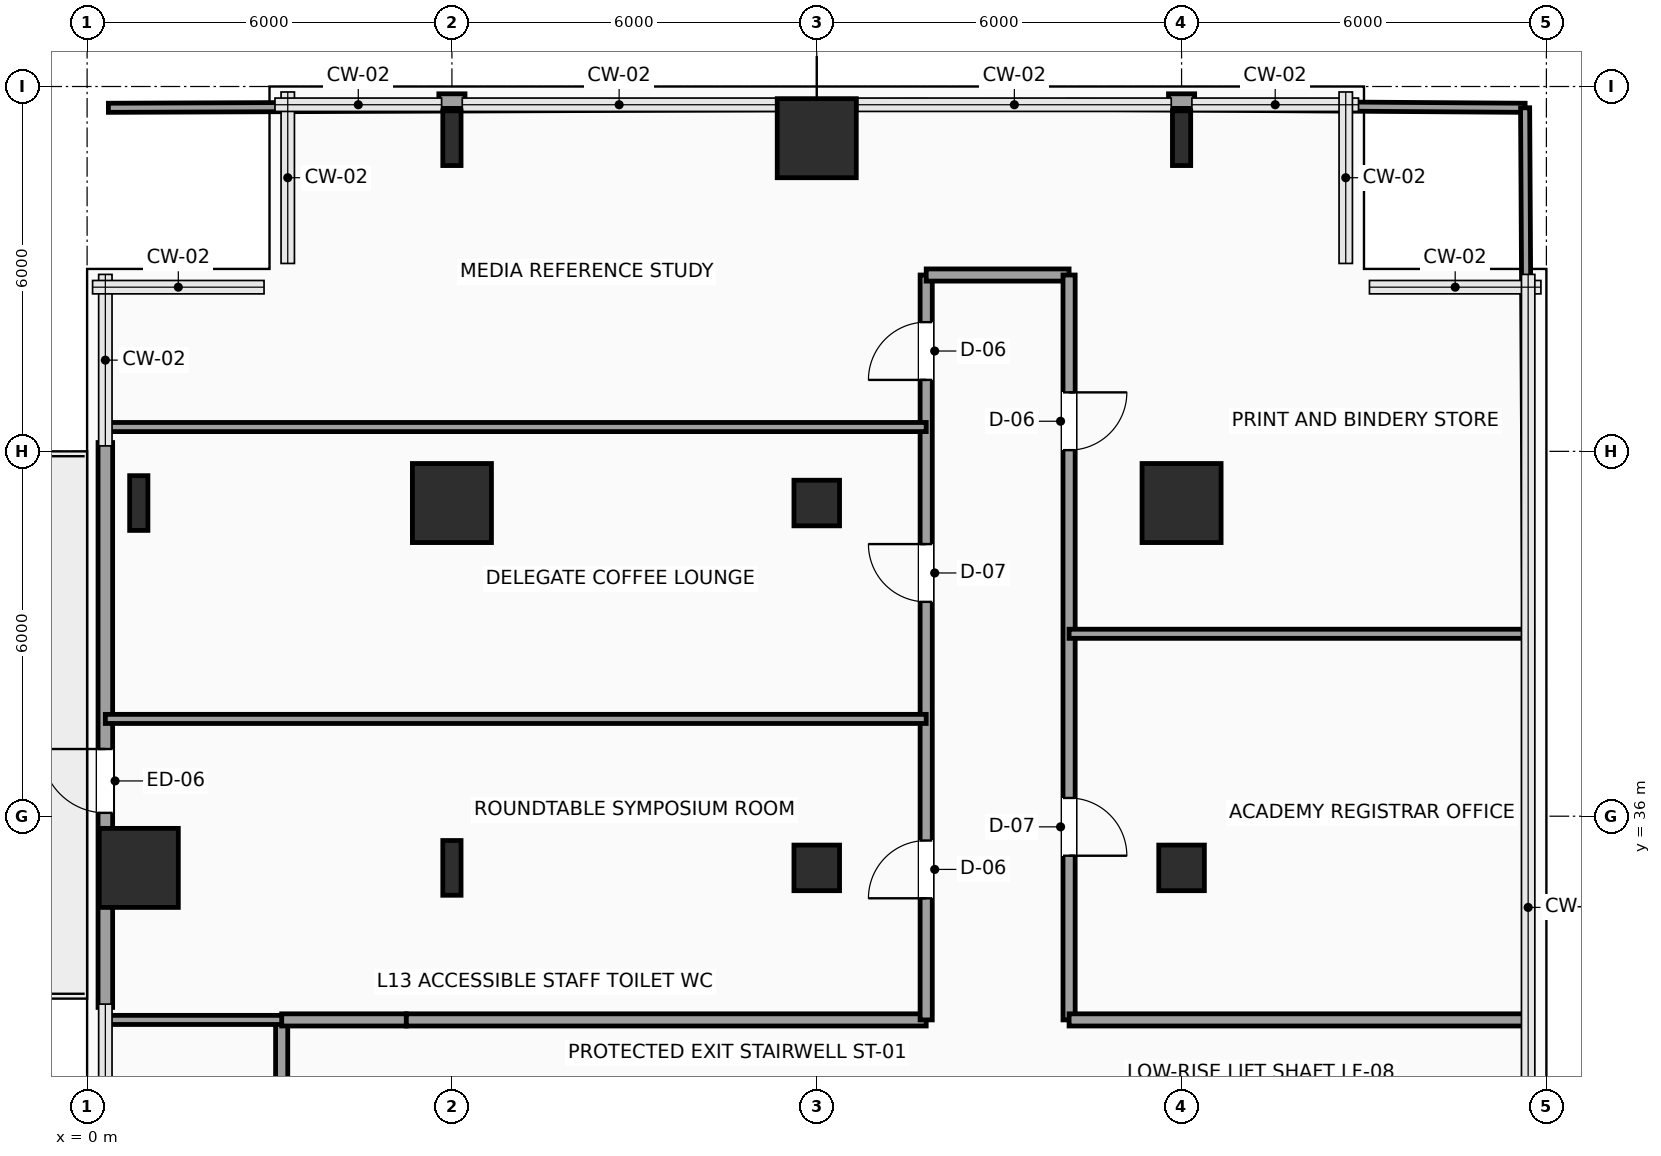
"""IFC4 building model, lengths in metres.
Left out: names, types, materials, properties, quantities, classifications, styles, units other than length and angle.
Written with IfcOpenShell. Run it as: python <this file> out.ifc"""

import sys

from ifc_helpers import new_model, si_unit, direction, frame, frame_2d, origin, origin_2d, place, context, subcontext, project, spatial, rectangle, hollow_rectangle, i_section, extrude, element, fill, save


model = new_model("IFC4")
c1 = context("Model", 3, precision=1e-05, world=origin(), true_north=direction((0.0, 1.0)))
c2 = subcontext(c1, "Body", "Model", "MODEL_VIEW")
j1 = project(units=[si_unit("LENGTHUNIT", "METRE"), si_unit("PLANEANGLEUNIT", "RADIAN")], contexts=[c1])
p1 = place(None, origin())
s1 = spatial("IfcSite", under=j1, at=p1, CompositionType="ELEMENT")
p2 = place(p1, origin())
s2 = spatial("IfcBuilding", under=s1, at=p2, CompositionType="ELEMENT")
p3 = place(p2, frame((0.0, 0.0, 59.7)))
s3 = spatial("IfcBuildingStorey", under=s2, at=p3, CompositionType="ELEMENT", Elevation=59.7)
p4 = place(p3, frame((0.85, 35.15, 0.0), z_axis=(0.0, 0.0, 1.0), x_axis=(1.0, 0.0, 0.0)))
e1 = element("IfcColumn", 1, at=p4, inside=s3, PredefinedType="COLUMN", context=c2, shape_type="SweptSolid", body=[
    extrude(rectangle(XDim=1.3, YDim=1.3, at=origin_2d()), origin(), (0.0, 0.0, 1.0), 3.9),
])
for number, where, z_axis, x_axis in (
    (2, (0.85, 41.15, 0.0), (0.0, 0.0, 1.0), (1.0, 0.0, 0.0)),
    (3, (6.0, 35.15, 0.0), (0.0, 0.0, 1.0), (1.0, 0.0, 0.0)),
):
    element("IfcColumn", number, at=place(p3, frame(where, z_axis=z_axis, x_axis=x_axis)), inside=s3, PredefinedType="COLUMN", context=c2, shape_type="SweptSolid", body=[
        extrude(i_section(OverallWidth=0.3, OverallDepth=0.9, WebThickness=0.019, FlangeThickness=0.035, FilletRadius=0.03, at=origin_2d()), origin(), (0.0, 0.0, 1.0), 3.9),
    ])
p5 = place(p3, frame((6.0, 41.15, 0.0), z_axis=(0.0, 0.0, 1.0), x_axis=(1.0, 0.0, 0.0)))
e4 = element("IfcColumn", 4, at=p5, inside=s3, PredefinedType="COLUMN", context=c2, shape_type="SweptSolid", body=[
    extrude(rectangle(XDim=1.3, YDim=1.3, at=origin_2d()), origin(), (0.0, 0.0, 1.0), 3.9),
])
p6 = place(p3, frame((6.0, 47.15, 0.0), z_axis=(0.0, 0.0, 1.0), x_axis=(1.0, 0.0, 0.0)))
e5 = element("IfcColumn", 5, at=p6, inside=s3, PredefinedType="COLUMN", context=c2, shape_type="SweptSolid", body=[
    extrude(i_section(OverallWidth=0.3, OverallDepth=0.9, WebThickness=0.019, FlangeThickness=0.035, FilletRadius=0.03, at=origin_2d()), origin(), (0.0, 0.0, 1.0), 3.9),
])
for number, where, z_axis, x_axis in (
    (6, (12.0, 35.15, 0.0), (0.0, 0.0, 1.0), (1.0, 0.0, 0.0)),
    (7, (12.0, 41.15, 0.0), (0.0, 0.0, 1.0), (1.0, 0.0, 0.0)),
):
    element("IfcColumn", number, at=place(p3, frame(where, z_axis=z_axis, x_axis=x_axis)), inside=s3, PredefinedType="COLUMN", context=c2, shape_type="SweptSolid", body=[
        extrude(hollow_rectangle(XDim=0.75, YDim=0.75, WallThickness=0.035, InnerFilletRadius=0.035, OuterFilletRadius=0.05, at=origin_2d()), origin(), (0.0, 0.0, 1.0), 3.9),
    ])
p7 = place(p3, frame((12.0, 47.15, 0.0), z_axis=(0.0, 0.0, 1.0), x_axis=(1.0, 0.0, 0.0)))
e8 = element("IfcColumn", 8, at=p7, inside=s3, PredefinedType="COLUMN", context=c2, shape_type="SweptSolid", body=[
    extrude(rectangle(XDim=1.3, YDim=1.3, at=origin_2d()), origin(), (0.0, 0.0, 1.0), 3.9),
])
p8 = place(p3, frame((18.0, 35.15, 0.0), z_axis=(0.0, 0.0, 1.0), x_axis=(1.0, 0.0, 0.0)))
e9 = element("IfcColumn", 9, at=p8, inside=s3, PredefinedType="COLUMN", context=c2, shape_type="SweptSolid", body=[
    extrude(hollow_rectangle(XDim=0.75, YDim=0.75, WallThickness=0.035, InnerFilletRadius=0.035, OuterFilletRadius=0.05, at=origin_2d()), origin(), (0.0, 0.0, 1.0), 3.9),
])
p9 = place(p3, frame((18.0, 41.15, 0.0), z_axis=(0.0, 0.0, 1.0), x_axis=(1.0, 0.0, 0.0)))
e10 = element("IfcColumn", 10, at=p9, inside=s3, PredefinedType="COLUMN", context=c2, shape_type="SweptSolid", body=[
    extrude(rectangle(XDim=1.3, YDim=1.3, at=origin_2d()), origin(), (0.0, 0.0, 1.0), 3.9),
])
p10 = place(p3, frame((18.0, 47.15, 0.0), z_axis=(0.0, 0.0, 1.0), x_axis=(1.0, 0.0, 0.0)))
e11 = element("IfcColumn", 11, at=p10, inside=s3, PredefinedType="COLUMN", context=c2, shape_type="SweptSolid", body=[
    extrude(i_section(OverallWidth=0.3, OverallDepth=0.9, WebThickness=0.019, FlangeThickness=0.035, FilletRadius=0.03, at=origin_2d()), origin(), (0.0, 0.0, 1.0), 3.9),
])
p11 = place(p3, frame((0.3, 32.855, 0.0), z_axis=(0.0, 0.0, 1.0), x_axis=(0.0, 1.0, 0.0)))
e12 = element("IfcWall", 12, at=p11, inside=s3, PredefinedType="SOLIDWALL", context=c2, shape_type="SweptSolid", body=[
    extrude(rectangle(XDim=9.29, YDim=0.24, at=frame_2d((4.645, 0.0))), origin(), (0.0, 0.0, 1.0), 3.65),
])
p12 = place(p11, frame((3.2, 0.0, 0.0)))
e13 = element("IfcOpeningElement", 13, at=p12, cuts=e12, PredefinedType="OPENING", context=c2, shape_type="SweptSolid", body=[
    extrude(rectangle(XDim=1.05, YDim=2.2, at=frame_2d((0.525, 1.1))), frame((0.0, 0.13, 0.0), z_axis=(0.0, -1.0, 0.0), x_axis=(1.0, 0.0, 0.0)), (0.0, 0.0, 1.0), 0.26),
])
for number, where, z_axis, x_axis in (
    (14, (5.785, 47.76, 0.0), (0.0, 0.0, 1.0), (1.0, 0.0, 0.0)),
    (15, (17.785, 47.76, 0.0), (0.0, 0.0, 1.0), (1.0, 0.0, 0.0)),
):
    element("IfcWall", number, at=place(p3, frame(where, z_axis=z_axis, x_axis=x_axis)), inside=s3, PredefinedType="SOLIDWALL", context=c2, shape_type="SweptSolid", body=[
        extrude(rectangle(XDim=0.43, YDim=0.24, at=frame_2d((0.215, 0.0))), origin(), (0.0, 0.0, 1.0), 3.65),
    ])
p13 = place(p3, frame((3.2, 30.25, 0.0), z_axis=(0.0, 0.0, 1.0), x_axis=(0.0, 1.0, 0.0)))
e16 = element("IfcWall", 16, at=p13, inside=s3, PredefinedType="SOLIDWALL", context=c2, shape_type="SweptSolid", body=[
    extrude(rectangle(XDim=2.4, YDim=0.2, at=frame_2d((1.2, 0.0))), origin(), (0.0, 0.0, 1.0), 3.65),
])
p14 = place(p3, frame((3.2, 32.65, 0.0), z_axis=(0.0, 0.0, 1.0), x_axis=(1.0, 0.0, 0.0)))
e17 = element("IfcWall", 17, at=p14, inside=s3, PredefinedType="SOLIDWALL", context=c2, shape_type="SweptSolid", body=[
    extrude(rectangle(XDim=2.05, YDim=0.2, at=frame_2d((1.025, 0.0))), origin(), (0.0, 0.0, 1.0), 3.65),
])
p15 = place(p3, frame((5.25, 32.65, 0.0), z_axis=(0.0, 0.0, 1.0), x_axis=(1.0, 0.0, 0.0)))
e18 = element("IfcWall", 18, at=p15, inside=s3, PredefinedType="SOLIDWALL", context=c2, shape_type="SweptSolid", body=[
    extrude(rectangle(XDim=8.55, YDim=0.2, at=frame_2d((4.275, 0.0))), origin(), (0.0, 0.0, 1.0), 3.65),
])
p16 = place(p3, frame((13.8, 32.65, 0.0), z_axis=(0.0, 0.0, 1.0), x_axis=(0.0, 1.0, 0.0)))
e19 = element("IfcWall", 19, at=p16, inside=s3, PredefinedType="SOLIDWALL", context=c2, shape_type="SweptSolid", body=[
    extrude(rectangle(XDim=12.25, YDim=0.2, at=frame_2d((6.125, 0.0))), origin(), (0.0, 0.0, 1.0), 3.65),
])
p17 = place(p16, frame((2.0, 0.0, 0.0)))
e20 = element("IfcOpeningElement", 20, at=p17, cuts=e19, PredefinedType="OPENING", context=c2, shape_type="SweptSolid", body=[
    extrude(rectangle(XDim=0.95, YDim=2.15, at=frame_2d((0.475, 1.075))), frame((0.0, 0.11, 0.0), z_axis=(0.0, -1.0, 0.0), x_axis=(1.0, 0.0, 0.0)), (0.0, 0.0, 1.0), 0.22),
])
p18 = place(p16, frame((6.875, 0.0, 0.0)))
e21 = element("IfcOpeningElement", 21, at=p18, cuts=e19, PredefinedType="OPENING", context=c2, shape_type="SweptSolid", body=[
    extrude(rectangle(XDim=0.95, YDim=2.15, at=frame_2d((0.475, 1.075))), frame((0.0, 0.11, 0.0), z_axis=(0.0, -1.0, 0.0), x_axis=(1.0, 0.0, 0.0)), (0.0, 0.0, 1.0), 0.22),
])
p19 = place(p16, frame((10.525, 0.0, 0.0)))
e22 = element("IfcOpeningElement", 22, at=p19, cuts=e19, PredefinedType="OPENING", context=c2, shape_type="SweptSolid", body=[
    extrude(rectangle(XDim=0.95, YDim=2.15, at=frame_2d((0.475, 1.075))), frame((0.0, 0.11, 0.0), z_axis=(0.0, -1.0, 0.0), x_axis=(1.0, 0.0, 0.0)), (0.0, 0.0, 1.0), 0.22),
])
p20 = place(p3, frame((13.8, 44.9, 0.0), z_axis=(0.0, 0.0, 1.0), x_axis=(1.0, 0.0, 0.0)))
e23 = element("IfcWall", 23, at=p20, inside=s3, PredefinedType="SOLIDWALL", context=c2, shape_type="SweptSolid", body=[
    extrude(rectangle(XDim=2.35, YDim=0.2, at=frame_2d((1.175, 0.0))), origin(), (0.0, 0.0, 1.0), 3.65),
])
p21 = place(p3, frame((16.15, 44.9, 0.0), z_axis=(0.0, 0.0, 1.0), x_axis=(0.0, -1.0, 0.0)))
e24 = element("IfcWall", 24, at=p21, inside=s3, PredefinedType="SOLIDWALL", context=c2, shape_type="SweptSolid", body=[
    extrude(rectangle(XDim=12.25, YDim=0.2, at=frame_2d((6.125, 0.0))), origin(), (0.0, 0.0, 1.0), 3.65),
])
p22 = place(p21, frame((8.6, 0.0, 0.0)))
e25 = element("IfcOpeningElement", 25, at=p22, cuts=e24, PredefinedType="OPENING", context=c2, shape_type="SweptSolid", body=[
    extrude(rectangle(XDim=0.95, YDim=2.15, at=frame_2d((0.475, 1.075))), frame((0.0, 0.11, 0.0), z_axis=(0.0, -1.0, 0.0), x_axis=(1.0, 0.0, 0.0)), (0.0, 0.0, 1.0), 0.22),
])
p23 = place(p21, frame((1.93, 0.0, 0.0)))
e26 = element("IfcOpeningElement", 26, at=p23, cuts=e24, PredefinedType="OPENING", context=c2, shape_type="SweptSolid", body=[
    extrude(rectangle(XDim=0.95, YDim=2.15, at=frame_2d((0.475, 1.075))), frame((0.0, 0.11, 0.0), z_axis=(0.0, -1.0, 0.0), x_axis=(1.0, 0.0, 0.0)), (0.0, 0.0, 1.0), 0.22),
])
p24 = place(p3, frame((16.15, 32.65, 0.0), z_axis=(0.0, 0.0, 1.0), x_axis=(1.0, 0.0, 0.0)))
e27 = element("IfcWall", 27, at=p24, inside=s3, PredefinedType="SOLIDWALL", context=c2, shape_type="SweptSolid", body=[
    extrude(rectangle(XDim=7.55, YDim=0.2, at=frame_2d((3.775, 0.0))), origin(), (0.0, 0.0, 1.0), 3.65),
])
for number, where, z_axis, x_axis in (
    (28, (0.3, 37.6, 0.0), (0.0, 0.0, 1.0), (1.0, 0.0, 0.0)),
    (29, (0.3, 42.4, 0.0), (0.0, 0.0, 1.0), (1.0, 0.0, 0.0)),
):
    element("IfcWall", number, at=place(p3, frame(where, z_axis=z_axis, x_axis=x_axis)), inside=s3, PredefinedType="PARTITIONING", context=c2, shape_type="SweptSolid", body=[
        extrude(rectangle(XDim=13.5, YDim=0.15, at=frame_2d((6.75, 0.0))), origin(), (0.0, 0.0, 1.0), 3.65),
    ])
p25 = place(p3, frame((0.35, 47.65, 0.0), z_axis=(0.0, 0.0, 1.0), x_axis=(0.99999304924, 0.003728467862, 0.0)))
e30 = element("IfcWall", 30, at=p25, inside=s3, PredefinedType="PARTITIONING", context=c2, shape_type="SweptSolid", body=[
    extrude(rectangle(XDim=5.435, YDim=0.15, at=frame_2d((2.717, 0.0))), origin(), (0.0, 0.0, 1.0), 3.65),
])
p26 = place(p3, frame((6.215, 47.672, 0.0), z_axis=(0.0, 0.0, 1.0), x_axis=(0.999993149305, 0.003701532515, 0.0)))
e31 = element("IfcWall", 31, at=p26, inside=s3, PredefinedType="PARTITIONING", context=c2, shape_type="SweptSolid", body=[
    extrude(rectangle(XDim=7.585, YDim=0.15, at=frame_2d((3.792, 0.0))), origin(), (0.0, 0.0, 1.0), 3.65),
])
p27 = place(p3, frame((16.15, 39.0, 0.0), z_axis=(0.0, 0.0, 1.0), x_axis=(1.0, 0.0, 0.0)))
e32 = element("IfcWall", 32, at=p27, inside=s3, PredefinedType="PARTITIONING", context=c2, shape_type="SweptSolid", body=[
    extrude(rectangle(XDim=7.55, YDim=0.15, at=frame_2d((3.775, 0.0))), origin(), (0.0, 0.0, 1.0), 3.65),
])
p28 = place(p3, frame((16.15, 47.7, 0.0), z_axis=(0.0, 0.0, 1.0), x_axis=(0.999978417552, -0.006569964219, 0.0)))
e33 = element("IfcWall", 33, at=p28, inside=s3, PredefinedType="PARTITIONING", context=c2, shape_type="SweptSolid", body=[
    extrude(rectangle(XDim=1.635, YDim=0.15, at=frame_2d((0.817, 0.0))), origin(), (0.0, 0.0, 1.0), 3.65),
])
p29 = place(p3, frame((18.215, 47.686, 0.0), z_axis=(0.0, 0.0, 1.0), x_axis=(0.999977600485, -0.006693170229, 0.0)))
e34 = element("IfcWall", 34, at=p29, inside=s3, PredefinedType="PARTITIONING", context=c2, shape_type="SweptSolid", body=[
    extrude(rectangle(XDim=5.435, YDim=0.15, at=frame_2d((2.717, 0.0))), origin(), (0.0, 0.0, 1.0), 3.65),
])
p30 = place(p3, frame((23.7, 39.0, 0.0), z_axis=(0.0, 0.0, 1.0), x_axis=(-0.005785960162, 0.999983261192, 0.0)))
e35 = element("IfcWall", 35, at=p30, inside=s3, PredefinedType="PARTITIONING", context=c2, shape_type="SweptSolid", body=[
    extrude(rectangle(XDim=8.65, YDim=0.15, at=frame_2d((4.325, 0.0))), origin(), (0.0, 0.0, 1.0), 3.65),
])
p31 = place(p3, frame((0.3, 32.65, 0.0), z_axis=(0.0, 0.0, 1.0), x_axis=(1.0, 0.0, 0.0)))
e36 = element("IfcWall", 36, at=p31, inside=s3, PredefinedType="PARTITIONING", context=c2, shape_type="SweptSolid", body=[
    extrude(rectangle(XDim=2.9, YDim=0.15, at=frame_2d((1.45, 0.0))), origin(), (0.0, 0.0, 1.0), 3.65),
])
p32 = place(p12, origin())
e37 = element("IfcDoor", 37, at=p32, inside=s3, OperationType="SINGLE_SWING_RIGHT", PredefinedType="DOOR", context=c2, shape_type="SweptSolid", body=[
    extrude(rectangle(XDim=1.05, YDim=2.2, at=frame_2d((0.525, 1.1))), frame((0.0, 0.025, 0.0), z_axis=(0.0, -1.0, 0.0), x_axis=(1.0, 0.0, 0.0)), (0.0, 0.0, 1.0), 0.05),
])
fill(e13, e37)
p33 = place(p17, origin())
e38 = element("IfcDoor", 38, at=p33, inside=s3, OperationType="SINGLE_SWING_LEFT", PredefinedType="DOOR", context=c2, shape_type="SweptSolid", body=[
    extrude(rectangle(XDim=0.95, YDim=2.15, at=frame_2d((0.475, 1.075))), frame((0.0, 0.025, 0.0), z_axis=(0.0, -1.0, 0.0), x_axis=(1.0, 0.0, 0.0)), (0.0, 0.0, 1.0), 0.05),
])
fill(e20, e38)
p34 = place(p18, origin())
e39 = element("IfcDoor", 39, at=p34, inside=s3, OperationType="SINGLE_SWING_RIGHT", PredefinedType="DOOR", context=c2, shape_type="SweptSolid", body=[
    extrude(rectangle(XDim=0.95, YDim=2.15, at=frame_2d((0.475, 1.075))), frame((0.0, 0.025, 0.0), z_axis=(0.0, -1.0, 0.0), x_axis=(1.0, 0.0, 0.0)), (0.0, 0.0, 1.0), 0.05),
])
fill(e21, e39)
p35 = place(p19, origin())
e40 = element("IfcDoor", 40, at=p35, inside=s3, OperationType="SINGLE_SWING_LEFT", PredefinedType="DOOR", context=c2, shape_type="SweptSolid", body=[
    extrude(rectangle(XDim=0.95, YDim=2.15, at=frame_2d((0.475, 1.075))), frame((0.0, 0.025, 0.0), z_axis=(0.0, -1.0, 0.0), x_axis=(1.0, 0.0, 0.0)), (0.0, 0.0, 1.0), 0.05),
])
fill(e22, e40)
p36 = place(p22, origin())
e41 = element("IfcDoor", 41, at=p36, inside=s3, OperationType="SINGLE_SWING_RIGHT", PredefinedType="DOOR", context=c2, shape_type="SweptSolid", body=[
    extrude(rectangle(XDim=0.95, YDim=2.15, at=frame_2d((0.475, 1.075))), frame((0.0, 0.025, 0.0), z_axis=(0.0, -1.0, 0.0), x_axis=(1.0, 0.0, 0.0)), (0.0, 0.0, 1.0), 0.05),
])
fill(e25, e41)
p37 = place(p23, origin())
e42 = element("IfcDoor", 42, at=p37, inside=s3, OperationType="SINGLE_SWING_LEFT", PredefinedType="DOOR", context=c2, shape_type="SweptSolid", body=[
    extrude(rectangle(XDim=0.95, YDim=2.15, at=frame_2d((0.475, 1.075))), frame((0.0, 0.025, 0.0), z_axis=(0.0, -1.0, 0.0), x_axis=(1.0, 0.0, 0.0)), (0.0, 0.0, 1.0), 0.05),
])
fill(e26, e42)
save(model, sys.argv[1])
